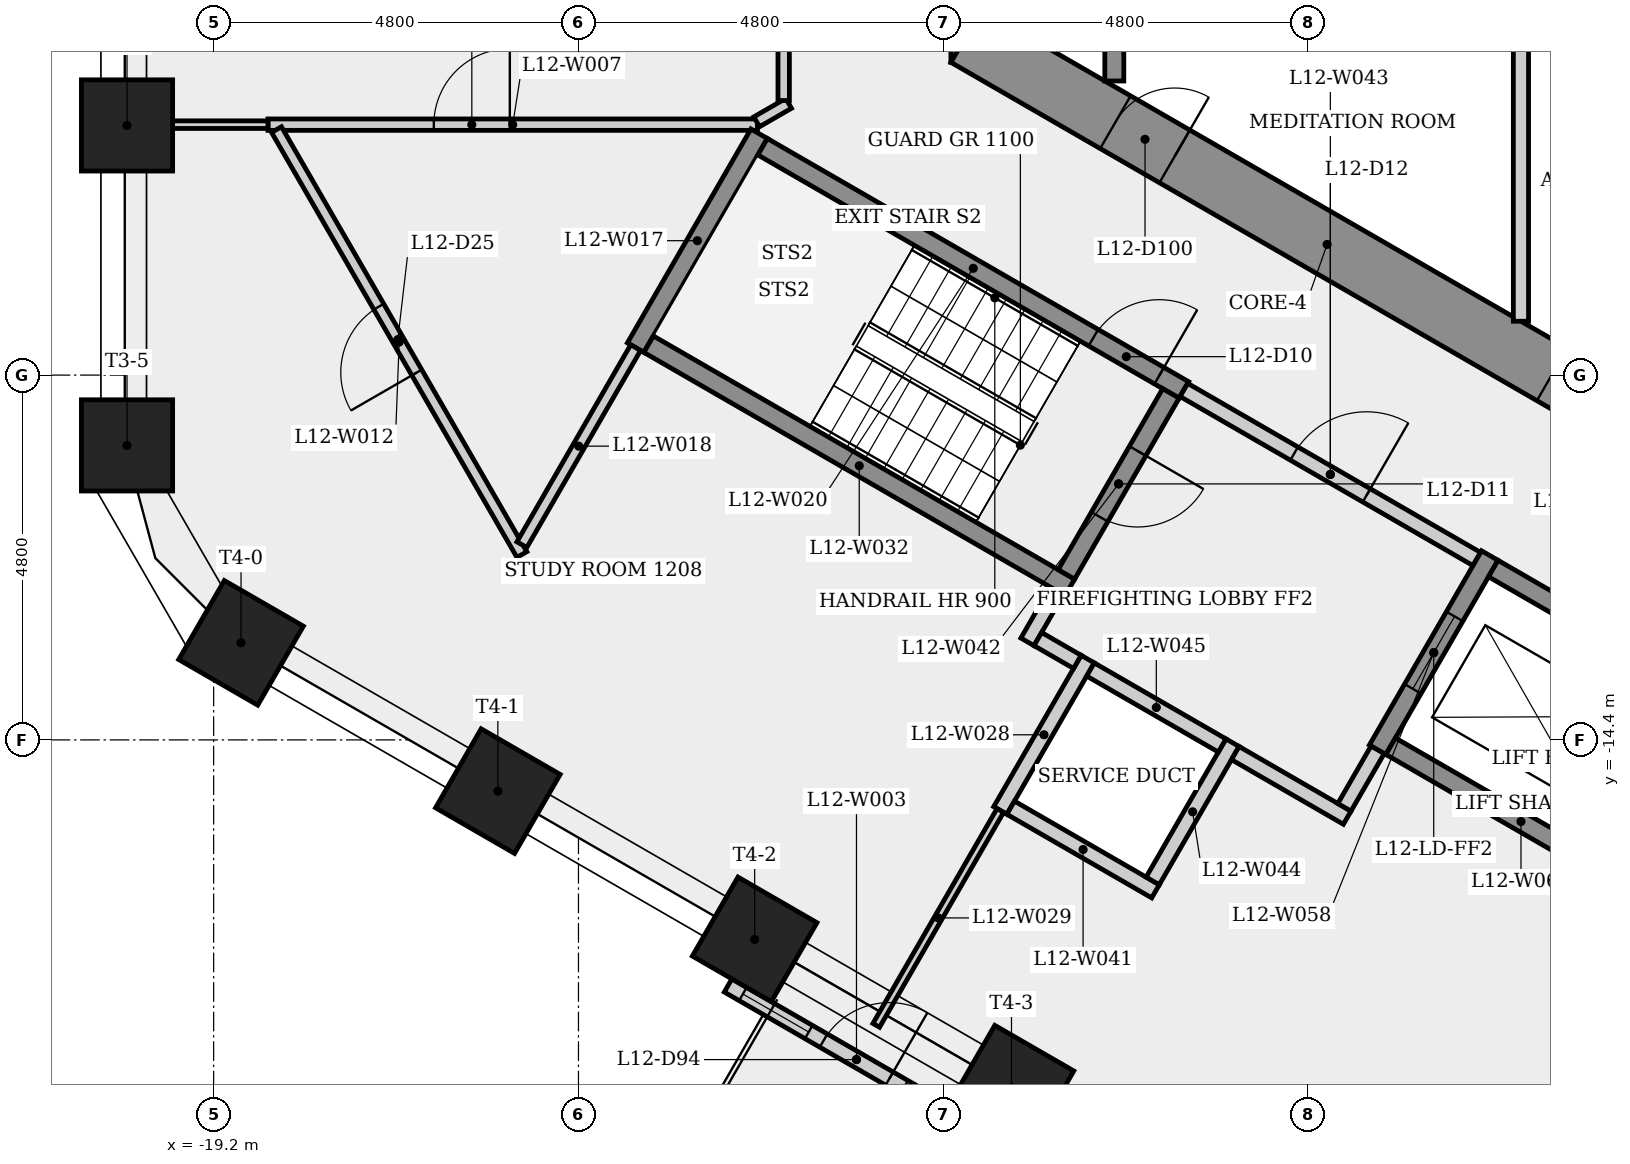
"""IFC4 building model, lengths in metres.
Left out: names, types, materials, properties, quantities, classifications, styles, units other than length and angle.
Written with IfcOpenShell. Run it as: python <this file> out.ifc"""

import sys

from ifc_helpers import new_model, si_unit, direction, frame, frame_2d, origin, origin_2d, place, context, subcontext, project, spatial, rectangle, extrude, element, fill, save


model = new_model("IFC4")
c1 = context("Model", 3, precision=1e-05, world=origin(), true_north=direction((0.0, 1.0)))
c2 = subcontext(c1, "Body", "Model", "MODEL_VIEW")
j1 = project(units=[si_unit("LENGTHUNIT", "METRE"), si_unit("PLANEANGLEUNIT", "RADIAN")], contexts=[c1])
p1 = place(None, origin())
s1 = spatial("IfcSite", under=j1, at=p1, CompositionType="ELEMENT")
p2 = place(p1, origin())
s2 = spatial("IfcBuilding", under=s1, at=p2, CompositionType="ELEMENT")
p3 = place(p2, frame((0.0, 0.0, 49.3)))
s3 = spatial("IfcBuildingStorey", under=s2, at=p3, CompositionType="ELEMENT", Elevation=49.3)
p4 = place(p3, frame((-9.1, 5.485, 0.0), z_axis=(0.0, 0.0, 1.0), x_axis=(0.0, -1.0, 0.0)))
e1 = element("IfcWall", 1, at=p4, inside=s3, PredefinedType="SHEAR", context=c2, shape_type="SweptSolid", body=[
    extrude(rectangle(XDim=10.97, YDim=0.8, at=frame_2d((5.485, 0.0))), origin(), (0.0, 0.0, 1.0), 3.4),
])
p5 = place(p4, frame((4.685, 0.0, 0.0)))
e2 = element("IfcOpeningElement", 2, at=p5, cuts=e1, PredefinedType="OPENING", context=c2, shape_type="SweptSolid", body=[
    extrude(rectangle(XDim=1.6, YDim=2.1, at=frame_2d((0.8, 1.05))), frame((0.0, 0.41, 0.0), z_axis=(0.0, -1.0, 0.0), x_axis=(1.0, 0.0, 0.0)), (0.0, 0.0, 1.0), 0.82),
])
p6 = place(p3, frame((-9.3, -5.138, 0.0), z_axis=(0.0, 0.0, 1.0), x_axis=(0.866023993627, -0.500002442456, 0.0)))
e3 = element("IfcWall", 3, at=p6, inside=s3, PredefinedType="SHEAR", context=c2, shape_type="SweptSolid", body=[
    extrude(rectangle(XDim=10.97, YDim=0.8, at=frame_2d((5.485, 0.0))), origin(), (0.0, 0.0, 1.0), 3.4),
])
p7 = place(p6, frame((2.268, 0.0, 0.0)))
e4 = element("IfcOpeningElement", 4, at=p7, cuts=e3, PredefinedType="OPENING", context=c2, shape_type="SweptSolid", body=[
    extrude(rectangle(XDim=0.9, YDim=2.1, at=frame_2d((0.45, 1.05))), frame((0.0, 0.41, 0.0), z_axis=(0.0, -1.0, 0.0), x_axis=(1.0, 0.0, 0.0)), (0.0, 0.0, 1.0), 0.82),
])
p8 = place(p6, frame((8.903, 0.0, 0.0)))
e5 = element("IfcOpeningElement", 5, at=p8, cuts=e3, PredefinedType="OPENING", context=c2, shape_type="SweptSolid", body=[
    extrude(rectangle(XDim=0.9, YDim=2.1, at=frame_2d((0.45, 1.05))), frame((0.0, 0.41, 0.0), z_axis=(0.0, -1.0, 0.0), x_axis=(1.0, 0.0, 0.0)), (0.0, 0.0, 1.0), 0.82),
])
for number, where, z_axis, x_axis in (
    (6, (-20.34, -6.315, 0.0), (0.0, 0.0, 1.0), (-1.0, 0.0, 0.0)),
    (7, (-20.34, -10.525, 0.0), (0.0, 0.0, 1.0), (-1.0, 0.0, 0.0)),
    (8, (-18.84, -13.123, 0.0), (0.0, 0.0, 1.0), (-0.5, -0.866, 0.0)),
    (9, (-15.461, -15.074, 0.0), (0.0, 0.0, 1.0), (-0.5, -0.866, 0.0)),
    (10, (-12.082, -17.025, 0.0), (0.0, 0.0, 1.0), (-0.5, -0.866, 0.0)),
    (11, (-8.703, -18.975, 0.0), (0.0, 0.0, 1.0), (-0.5, -0.866, 0.0)),
):
    element("IfcColumn", number, at=place(p3, frame(where, z_axis=z_axis, x_axis=x_axis)), inside=s3, PredefinedType="COLUMN", context=c2, shape_type="SweptSolid", body=[
        extrude(rectangle(XDim=1.2, YDim=1.2, at=origin_2d()), origin(), (0.0, 0.0, 1.0), 3.4),
    ])
p9 = place(p3, frame((-12.431, -17.631, 0.0), z_axis=(0.0, 0.0, 1.0), x_axis=(0.86603551244, -0.499982490886, 0.0)))
e12 = element("IfcWall", 12, at=p9, inside=s3, PredefinedType="SOLIDWALL", context=c2, shape_type="SweptSolid", body=[
    extrude(rectangle(XDim=3.901, YDim=0.2, at=frame_2d((1.951, 0.0))), origin(), (0.0, 0.0, 1.0), 3.4),
])
p10 = place(p9, frame((1.45, 0.0, 0.0)))
e13 = element("IfcOpeningElement", 13, at=p10, cuts=e12, PredefinedType="OPENING", context=c2, shape_type="SweptSolid", body=[
    extrude(rectangle(XDim=1.0, YDim=2.4, at=frame_2d((0.5, 1.2))), frame((0.0, 0.11, 0.0), z_axis=(0.0, -1.0, 0.0), x_axis=(1.0, 0.0, 0.0)), (0.0, 0.0, 1.0), 0.22),
])
p11 = place(p9, frame((0.225, 0.0, 0.9)))
e14 = element("IfcOpeningElement", 14, at=p11, cuts=e12, PredefinedType="OPENING", context=c2, shape_type="SweptSolid", body=[
    extrude(rectangle(XDim=1.0, YDim=1.5, at=frame_2d((0.5, 0.75))), frame((0.0, 0.11, 0.0), z_axis=(0.0, -1.0, 0.0), x_axis=(1.0, 0.0, 0.0)), (0.0, 0.0, 1.0), 0.22),
])
p12 = place(p9, frame((2.676, 0.0, 0.9)))
e15 = element("IfcOpeningElement", 15, at=p12, cuts=e12, PredefinedType="OPENING", context=c2, shape_type="SweptSolid", body=[
    extrude(rectangle(XDim=1.0, YDim=1.5, at=frame_2d((0.5, 0.75))), frame((0.0, 0.11, 0.0), z_axis=(0.0, -1.0, 0.0), x_axis=(1.0, 0.0, 0.0)), (0.0, 0.0, 1.0), 0.22),
])
p13 = place(p3, frame((-18.485, -6.305, 0.0), z_axis=(0.0, 0.0, 1.0), x_axis=(1.0, 0.0, 0.0)))
e16 = element("IfcWall", 16, at=p13, inside=s3, PredefinedType="PARTITIONING", context=c2, shape_type="SweptSolid", body=[
    extrude(rectangle(XDim=6.44, YDim=0.15, at=frame_2d((3.22, 0.0))), origin(), (0.0, 0.0, 1.0), 3.05),
])
p14 = place(p13, frame((2.182, 0.0, 0.0)))
e17 = element("IfcOpeningElement", 17, at=p14, cuts=e16, PredefinedType="OPENING", context=c2, shape_type="SweptSolid", body=[
    extrude(rectangle(XDim=1.0, YDim=2.1, at=frame_2d((0.5, 1.05))), frame((0.0, 0.085, 0.0), z_axis=(0.0, -1.0, 0.0), x_axis=(1.0, 0.0, 0.0)), (0.0, 0.0, 1.0), 0.17),
])
p15 = place(p3, frame((-18.485, -6.305, 0.0), z_axis=(0.0, 0.0, 1.0), x_axis=(-1.0, 0.0, 0.0)))
e18 = element("IfcWall", 18, at=p15, inside=s3, PredefinedType="PARTITIONING", context=c2, shape_type="SweptSolid", body=[
    extrude(rectangle(XDim=1.884, YDim=0.1, at=frame_2d((0.942, 0.0))), origin(), (0.0, 0.0, 1.0), 3.05),
])
p16 = place(p3, frame((-15.145, -11.961, 0.0), z_axis=(0.0, 0.0, 1.0), x_axis=(-0.500014864668, 0.866016821494, 0.0)))
e19 = element("IfcWall", 19, at=p16, inside=s3, PredefinedType="PARTITIONING", context=c2, shape_type="SweptSolid", body=[
    extrude(rectangle(XDim=6.456, YDim=0.15, at=frame_2d((3.228, 0.0))), origin(), (0.0, 0.0, 1.0), 3.05),
])
p17 = place(p16, frame((2.766, 0.0, 0.0)))
e20 = element("IfcOpeningElement", 20, at=p17, cuts=e19, PredefinedType="OPENING", context=c2, shape_type="SweptSolid", body=[
    extrude(rectangle(XDim=1.0, YDim=2.1, at=frame_2d((0.5, 1.05))), frame((0.0, 0.085, 0.0), z_axis=(0.0, -1.0, 0.0), x_axis=(1.0, 0.0, 0.0)), (0.0, 0.0, 1.0), 0.17),
])
p18 = place(p3, frame((-13.648, -9.239, 0.0), z_axis=(0.0, 0.0, 1.0), x_axis=(0.500017246033, 0.866015446554, 0.0)))
e21 = element("IfcWall", 21, at=p18, inside=s3, PredefinedType="SHEAR", context=c2, shape_type="SweptSolid", body=[
    extrude(rectangle(XDim=3.25, YDim=0.25, at=frame_2d((1.625, 0.0))), origin(), (0.0, 0.0, 1.0), 3.05),
])
p19 = place(p3, frame((-13.648, -9.239, 0.0), z_axis=(0.0, 0.0, 1.0), x_axis=(-0.500042502709, -0.866000863443, 0.0)))
e22 = element("IfcWall", 22, at=p19, inside=s3, PredefinedType="PARTITIONING", context=c2, shape_type="SweptSolid", body=[
    extrude(rectangle(XDim=2.993, YDim=0.15, at=frame_2d((1.497, 0.0))), origin(), (0.0, 0.0, 1.0), 3.05),
])
p20 = place(p3, frame((-12.055, -6.267, 0.0), z_axis=(0.0, 0.0, 1.0), x_axis=(0.86616044843, 0.49976602283, 0.0)))
e23 = element("IfcWall", 23, at=p20, inside=s3, PredefinedType="PARTITIONING", context=c2, shape_type="SweptSolid", body=[
    extrude(rectangle(XDim=0.485, YDim=0.15, at=frame_2d((0.243, 0.0))), origin(), (0.0, 0.0, 1.0), 3.05),
])
p21 = place(p3, frame((-11.977, -6.595, 0.0), z_axis=(0.0, 0.0, 1.0), x_axis=(0.866025499775, -0.499999833739, 0.0)))
e24 = element("IfcWall", 24, at=p21, inside=s3, PredefinedType="SHEAR", context=c2, shape_type="SweptSolid", body=[
    extrude(rectangle(XDim=6.4, YDim=0.25, at=frame_2d((3.2, 0.0))), origin(), (0.0, 0.0, 1.0), 3.05),
])
p22 = place(p21, frame((5.025, 0.0, 0.0)))
e25 = element("IfcOpeningElement", 25, at=p22, cuts=e24, PredefinedType="OPENING", context=c2, shape_type="SweptSolid", body=[
    extrude(rectangle(XDim=1.0, YDim=2.1, at=frame_2d((0.5, 1.05))), frame((0.0, 0.135, 0.0), z_axis=(0.0, -1.0, 0.0), x_axis=(1.0, 0.0, 0.0)), (0.0, 0.0, 1.0), 0.27),
])
p23 = place(p3, frame((-11.7, 6.137, 0.0), z_axis=(0.0, 0.0, 1.0), x_axis=(0.0, -1.0, 0.0)))
e26 = element("IfcWall", 26, at=p23, inside=s3, PredefinedType="PARTITIONING", context=c2, shape_type="SweptSolid", body=[
    extrude(rectangle(XDim=12.125, YDim=0.15, at=frame_2d((6.062, 0.0))), origin(), (0.0, 0.0, 1.0), 3.05),
])
p24 = place(p23, frame((5.637, 0.0, 0.0)))
e27 = element("IfcOpeningElement", 27, at=p24, cuts=e26, PredefinedType="OPENING", context=c2, shape_type="SweptSolid", body=[
    extrude(rectangle(XDim=1.0, YDim=2.1, at=frame_2d((0.5, 1.05))), frame((0.0, 0.085, 0.0), z_axis=(0.0, -1.0, 0.0), x_axis=(1.0, 0.0, 0.0)), (0.0, 0.0, 1.0), 0.17),
])
p25 = place(p3, frame((-8.85, -15.329, 0.0), z_axis=(0.0, 0.0, 1.0), x_axis=(0.500077740698, 0.865980515519, 0.0)))
e28 = element("IfcWall", 28, at=p25, inside=s3, PredefinedType="PLUMBINGWALL", context=c2, shape_type="SweptSolid", body=[
    extrude(rectangle(XDim=2.3, YDim=0.2, at=frame_2d((1.15, 0.0))), origin(), (0.0, 0.0, 1.0), 3.05),
])
p26 = place(p3, frame((-8.85, -15.329, 0.0), z_axis=(0.0, 0.0, 1.0), x_axis=(-0.499983540639, -0.866034906392, 0.0)))
e29 = element("IfcWall", 29, at=p26, inside=s3, PredefinedType="PARTITIONING", context=c2, shape_type="SweptSolid", body=[
    extrude(rectangle(XDim=3.265, YDim=0.1, at=frame_2d((1.632, 0.0))), origin(), (0.0, 0.0, 1.0), 3.05),
])
p27 = place(p3, frame((-8.493, -13.11, 0.0), z_axis=(0.0, 0.0, 1.0), x_axis=(0.500067724834, 0.865986299303, 0.0)))
e30 = element("IfcWall", 30, at=p27, inside=s3, PredefinedType="PARTITIONING", context=c2, shape_type="SweptSolid", body=[
    extrude(rectangle(XDim=0.775, YDim=0.2, at=frame_2d((0.388, 0.0))), origin(), (0.0, 0.0, 1.0), 3.05),
])
p28 = place(p3, frame((-7.935, -12.393, 0.0), z_axis=(0.0, 0.0, 1.0), x_axis=(-0.866025499775, 0.499999833739, 0.0)))
e31 = element("IfcWall", 31, at=p28, inside=s3, PredefinedType="SHEAR", context=c2, shape_type="SweptSolid", body=[
    extrude(rectangle(XDim=6.4, YDim=0.25, at=frame_2d((3.2, 0.0))), origin(), (0.0, 0.0, 1.0), 3.05),
])
p29 = place(p3, frame((-7.836, -13.373, 0.0), z_axis=(0.0, 0.0, 1.0), x_axis=(-0.866232998003, 0.499640263761, 0.0)))
e32 = element("IfcWall", 32, at=p29, inside=s3, PredefinedType="PARTITIONING", context=c2, shape_type="SweptSolid", body=[
    extrude(rectangle(XDim=0.6, YDim=0.2, at=frame_2d((0.3, 0.0))), origin(), (0.0, 0.0, 1.0), 3.05),
])
p30 = place(p3, frame((-7.35, -5.73, 0.0), z_axis=(0.0, 0.0, 1.0), x_axis=(0.0, 1.0, 0.0)))
e33 = element("IfcWall", 33, at=p30, inside=s3, PredefinedType="SHEAR", context=c2, shape_type="SweptSolid", body=[
    extrude(rectangle(XDim=4.055, YDim=0.25, at=frame_2d((2.028, 0.0))), origin(), (0.0, 0.0, 1.0), 3.05),
])
p31 = place(p3, frame((-6.808, -16.392, 0.0), z_axis=(0.0, 0.0, 1.0), x_axis=(-0.866008176907, 0.50002983664, 0.0)))
e34 = element("IfcWall", 34, at=p31, inside=s3, PredefinedType="PLUMBINGWALL", context=c2, shape_type="SweptSolid", body=[
    extrude(rectangle(XDim=2.2, YDim=0.2, at=frame_2d((1.1, 0.0))), origin(), (0.0, 0.0, 1.0), 3.05),
])
p32 = place(p3, frame((-6.605, -9.841, 0.0), z_axis=(0.0, 0.0, 1.0), x_axis=(-0.499996545922, -0.866027397988, 0.0)))
e35 = element("IfcWall", 35, at=p32, inside=s3, PredefinedType="SHEAR", context=c2, shape_type="SweptSolid", body=[
    extrude(rectangle(XDim=2.75, YDim=0.25, at=frame_2d((1.375, 0.0))), origin(), (0.0, 0.0, 1.0), 3.05),
])
p33 = place(p32, frame((0.875, 0.0, 0.0)))
e36 = element("IfcOpeningElement", 36, at=p33, cuts=e35, PredefinedType="OPENING", context=c2, shape_type="SweptSolid", body=[
    extrude(rectangle(XDim=1.0, YDim=2.1, at=frame_2d((0.5, 1.05))), frame((0.0, 0.135, 0.0), z_axis=(0.0, -1.0, 0.0), x_axis=(1.0, 0.0, 0.0)), (0.0, 0.0, 1.0), 0.27),
])
p34 = place(p3, frame((-6.435, -9.795, 0.0), z_axis=(0.0, 0.0, 1.0), x_axis=(0.866012907634, -0.500021643343, 0.0)))
e37 = element("IfcWall", 37, at=p34, inside=s3, PredefinedType="PARTITIONING", context=c2, shape_type="SweptSolid", body=[
    extrude(rectangle(XDim=4.45, YDim=0.2, at=frame_2d((2.225, 0.0))), origin(), (0.0, 0.0, 1.0), 3.05),
])
p35 = place(p34, frame((1.675, 0.0, 0.0)))
e38 = element("IfcOpeningElement", 38, at=p35, cuts=e37, PredefinedType="OPENING", context=c2, shape_type="SweptSolid", body=[
    extrude(rectangle(XDim=1.1, YDim=2.1, at=frame_2d((0.55, 1.05))), frame((0.0, 0.11, 0.0), z_axis=(0.0, -1.0, 0.0), x_axis=(1.0, 0.0, 0.0)), (0.0, 0.0, 1.0), 0.22),
])
p36 = place(p3, frame((-5.795, -14.437, 0.0), z_axis=(0.0, 0.0, 1.0), x_axis=(-0.500027713859, -0.866009402589, 0.0)))
e39 = element("IfcWall", 39, at=p36, inside=s3, PredefinedType="PLUMBINGWALL", context=c2, shape_type="SweptSolid", body=[
    extrude(rectangle(XDim=2.1, YDim=0.2, at=frame_2d((1.05, 0.0))), origin(), (0.0, 0.0, 1.0), 3.05),
])
p37 = place(p3, frame((-5.931, -14.473, 0.0), z_axis=(0.0, 0.0, 1.0), x_axis=(-0.866041268327, 0.499972520799, 0.0)))
e40 = element("IfcWall", 40, at=p37, inside=s3, PredefinedType="PLUMBINGWALL", context=c2, shape_type="SweptSolid", body=[
    extrude(rectangle(XDim=2.0, YDim=0.2, at=frame_2d((1.0, 0.0))), origin(), (0.0, 0.0, 1.0), 3.05),
])
p38 = place(p3, frame((-4.286, -15.423, 0.0), z_axis=(0.0, 0.0, 1.0), x_axis=(-0.866025371046, 0.500000056704, 0.0)))
e41 = element("IfcWall", 41, at=p38, inside=s3, PredefinedType="PARTITIONING", context=c2, shape_type="SweptSolid", body=[
    extrude(rectangle(XDim=1.7, YDim=0.2, at=frame_2d((0.85, 0.0))), origin(), (0.0, 0.0, 1.0), 3.05),
])
p39 = place(p3, frame((-3.885, -14.529, 0.0), z_axis=(0.0, 0.0, 1.0), x_axis=(-0.499859285417, -0.866106630146, 0.0)))
e42 = element("IfcWall", 42, at=p39, inside=s3, PredefinedType="PARTITIONING", context=c2, shape_type="SweptSolid", body=[
    extrude(rectangle(XDim=0.875, YDim=0.2, at=frame_2d((0.438, 0.0))), origin(), (0.0, 0.0, 1.0), 3.05),
])
p40 = place(p3, frame((-2.41, -11.974, 0.0), z_axis=(0.0, 0.0, 1.0), x_axis=(-0.500001826776, -0.866024349092, 0.0)))
e43 = element("IfcWall", 43, at=p40, inside=s3, PredefinedType="SHEAR", context=c2, shape_type="SweptSolid", body=[
    extrude(rectangle(XDim=2.95, YDim=0.25, at=frame_2d((1.475, 0.0))), origin(), (0.0, 0.0, 1.0), 3.05),
])
p41 = place(p40, frame((0.925, 0.0, 0.0)))
e44 = element("IfcOpeningElement", 44, at=p41, cuts=e43, PredefinedType="OPENING", context=c2, shape_type="SweptSolid", body=[
    extrude(rectangle(XDim=1.1, YDim=2.1, at=frame_2d((0.55, 1.05))), frame((0.0, 0.135, 0.0), z_axis=(0.0, -1.0, 0.0), x_axis=(1.0, 0.0, 0.0)), (0.0, 0.0, 1.0), 0.27),
])
p42 = place(p3, frame((-2.364, -12.145, 0.0), z_axis=(0.0, 0.0, 1.0), x_axis=(0.86603892542, -0.499976579108, 0.0)))
e45 = element("IfcWall", 45, at=p42, inside=s3, PredefinedType="SHEAR", context=c2, shape_type="SweptSolid", body=[
    extrude(rectangle(XDim=2.162, YDim=0.25, at=frame_2d((1.081, 0.0))), origin(), (0.0, 0.0, 1.0), 3.05),
])
p43 = place(p3, frame((-2.0, -5.275, 0.0), z_axis=(0.0, 0.0, 1.0), x_axis=(0.0, -1.0, 0.0)))
e46 = element("IfcWall", 46, at=p43, inside=s3, PredefinedType="PARTITIONING", context=c2, shape_type="SweptSolid", body=[
    extrude(rectangle(XDim=3.616, YDim=0.2, at=frame_2d((1.808, 0.0))), origin(), (0.0, 0.0, 1.0), 3.05),
])
p44 = place(p3, frame((-0.856, -16.133, 0.0), z_axis=(0.0, 0.0, 1.0), x_axis=(-0.866021716278, 0.500006386895, 0.0)))
e47 = element("IfcWall", 47, at=p44, inside=s3, PredefinedType="SHEAR", context=c2, shape_type="SweptSolid", body=[
    extrude(rectangle(XDim=3.3, YDim=0.25, at=frame_2d((1.65, 0.0))), origin(), (0.0, 0.0, 1.0), 3.05),
])
p45 = place(p10, origin())
e48 = element("IfcDoor", 48, at=p45, inside=s3, OperationType="SINGLE_SWING_RIGHT", PredefinedType="DOOR", context=c2, shape_type="SweptSolid", body=[
    extrude(rectangle(XDim=1.0, YDim=2.4, at=frame_2d((0.5, 1.2))), frame((0.0, 0.025, 0.0), z_axis=(0.0, -1.0, 0.0), x_axis=(1.0, 0.0, 0.0)), (0.0, 0.0, 1.0), 0.05),
])
fill(e13, e48)
p46 = place(p11, origin())
e49 = element("IfcWindow", 49, at=p46, inside=s3, PartitioningType="SINGLE_PANEL", PredefinedType="WINDOW", context=c2, shape_type="SweptSolid", body=[
    extrude(rectangle(XDim=1.0, YDim=1.5, at=frame_2d((0.5, 0.75))), frame((0.0, 0.03, 0.0), z_axis=(0.0, -1.0, 0.0), x_axis=(1.0, 0.0, 0.0)), (0.0, 0.0, 1.0), 0.06),
])
fill(e14, e49)
p47 = place(p22, origin())
e50 = element("IfcDoor", 50, at=p47, inside=s3, OperationType="SINGLE_SWING_RIGHT", PredefinedType="DOOR", context=c2, shape_type="SweptSolid", body=[
    extrude(rectangle(XDim=1.0, YDim=2.1, at=frame_2d((0.5, 1.05))), frame((0.0, 0.025, 0.0), z_axis=(0.0, -1.0, 0.0), x_axis=(1.0, 0.0, 0.0)), (0.0, 0.0, 1.0), 0.05),
])
fill(e25, e50)
p48 = place(p33, origin())
e51 = element("IfcDoor", 51, at=p48, inside=s3, OperationType="SINGLE_SWING_LEFT", PredefinedType="DOOR", context=c2, shape_type="SweptSolid", body=[
    extrude(rectangle(XDim=1.0, YDim=2.1, at=frame_2d((0.5, 1.05))), frame((0.0, 0.025, 0.0), z_axis=(0.0, -1.0, 0.0), x_axis=(1.0, 0.0, 0.0)), (0.0, 0.0, 1.0), 0.05),
])
fill(e36, e51)
p49 = place(p35, origin())
e52 = element("IfcDoor", 52, at=p49, inside=s3, OperationType="SINGLE_SWING_RIGHT", PredefinedType="DOOR", context=c2, shape_type="SweptSolid", body=[
    extrude(rectangle(XDim=1.1, YDim=2.1, at=frame_2d((0.55, 1.05))), frame((0.0, 0.025, 0.0), z_axis=(0.0, -1.0, 0.0), x_axis=(1.0, 0.0, 0.0)), (0.0, 0.0, 1.0), 0.05),
])
fill(e38, e52)
p50 = place(p41, origin())
e53 = element("IfcDoor", 53, at=p50, inside=s3, OperationType="SLIDING_TO_LEFT", PredefinedType="DOOR", context=c2, shape_type="SweptSolid", body=[
    extrude(rectangle(XDim=1.1, YDim=2.1, at=frame_2d((0.55, 1.05))), frame((0.0, 0.025, 0.0), z_axis=(0.0, -1.0, 0.0), x_axis=(1.0, 0.0, 0.0)), (0.0, 0.0, 1.0), 0.05),
])
fill(e44, e53)
p51 = place(p14, origin())
e54 = element("IfcDoor", 54, at=p51, inside=s3, OperationType="SINGLE_SWING_RIGHT", PredefinedType="DOOR", context=c2, shape_type="SweptSolid", body=[
    extrude(rectangle(XDim=1.0, YDim=2.1, at=frame_2d((0.5, 1.05))), frame((0.0, 0.025, 0.0), z_axis=(0.0, -1.0, 0.0), x_axis=(1.0, 0.0, 0.0)), (0.0, 0.0, 1.0), 0.05),
])
fill(e17, e54)
p52 = place(p17, origin())
e55 = element("IfcDoor", 55, at=p52, inside=s3, OperationType="SINGLE_SWING_LEFT", PredefinedType="DOOR", context=c2, shape_type="SweptSolid", body=[
    extrude(rectangle(XDim=1.0, YDim=2.1, at=frame_2d((0.5, 1.05))), frame((0.0, 0.025, 0.0), z_axis=(0.0, -1.0, 0.0), x_axis=(1.0, 0.0, 0.0)), (0.0, 0.0, 1.0), 0.05),
])
fill(e20, e55)
p53 = place(p7, origin())
e56 = element("IfcDoor", 56, at=p53, inside=s3, OperationType="SINGLE_SWING_RIGHT", PredefinedType="DOOR", context=c2, shape_type="SweptSolid", body=[
    extrude(rectangle(XDim=0.9, YDim=2.1, at=frame_2d((0.45, 1.05))), frame((0.0, 0.025, 0.0), z_axis=(0.0, -1.0, 0.0), x_axis=(1.0, 0.0, 0.0)), (0.0, 0.0, 1.0), 0.05),
])
fill(e4, e56)
save(model, sys.argv[1])
